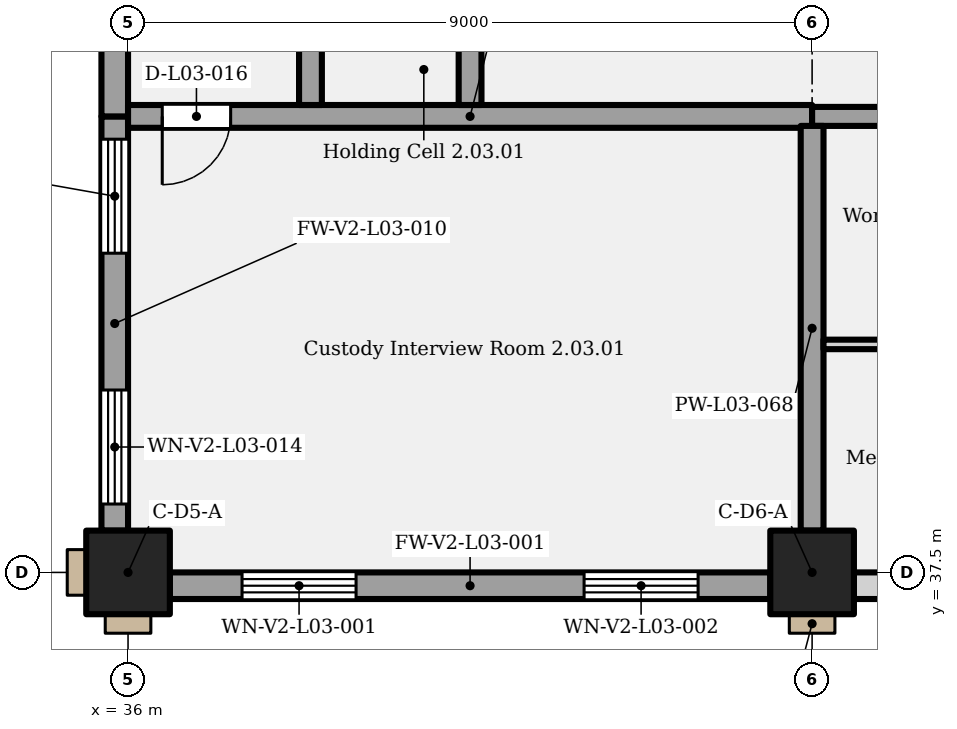
"""IFC4 building model, lengths in metres.
Left out: names, types, materials, properties, quantities, classifications, styles, units other than length and angle.
Written with IfcOpenShell. Run it as: python <this file> out.ifc"""

import sys

from ifc_helpers import new_model, si_unit, direction, frame, frame_2d, origin, origin_2d, place, context, subcontext, project, spatial, rectangle, extrude, element, fill, save


model = new_model("IFC4")
c1 = context("Model", 3, precision=1e-05, world=origin(), true_north=direction((0.0, 1.0)))
c2 = subcontext(c1, "Body", "Model", "MODEL_VIEW")
j1 = project(units=[si_unit("LENGTHUNIT", "METRE"), si_unit("PLANEANGLEUNIT", "RADIAN")], contexts=[c1])
p1 = place(None, origin())
s1 = spatial("IfcSite", under=j1, at=p1, CompositionType="ELEMENT")
p2 = place(p1, origin())
s2 = spatial("IfcBuilding", under=s1, at=p2, CompositionType="ELEMENT")
p3 = place(p2, frame((0.0, 0.0, 17.4)))
s3 = spatial("IfcBuildingStorey", under=s2, at=p3, CompositionType="ELEMENT", Elevation=17.4)
for number, where, z_axis, x_axis in (
    (1, (36.0, 37.5, 0.0), (0.0, 0.0, 1.0), (1.0, 0.0, 0.0)),
    (2, (45.0, 37.5, 0.0), (0.0, 0.0, 1.0), (1.0, 0.0, 0.0)),
):
    element("IfcColumn", number, at=place(p3, frame(where, z_axis=z_axis, x_axis=x_axis)), inside=s3, PredefinedType="COLUMN", context=c2, shape_type="SweptSolid", body=[
        extrude(rectangle(XDim=1.1, YDim=1.1, at=origin_2d()), origin(), (0.0, 0.0, 1.0), 5.4),
    ])
p4 = place(p3, frame((36.55, 37.325, 0.0), z_axis=(0.0, 0.0, 1.0), x_axis=(1.0, 0.0, 0.0)))
e3 = element("IfcWall", 3, at=p4, inside=s3, PredefinedType="SOLIDWALL", context=c2, shape_type="SweptSolid", body=[
    extrude(rectangle(XDim=7.9, YDim=0.35, at=frame_2d((3.95, 0.0))), origin(), (0.0, 0.0, 1.0), 5.15),
])
p5 = place(p4, frame((0.95, 0.0, 1.05)))
e4 = element("IfcOpeningElement", 4, at=p5, cuts=e3, PredefinedType="OPENING", context=c2, shape_type="SweptSolid", body=[
    extrude(rectangle(XDim=1.5, YDim=3.5, at=frame_2d((0.75, 1.75))), frame((0.0, 0.185, 0.0), z_axis=(0.0, -1.0, 0.0), x_axis=(1.0, 0.0, 0.0)), (0.0, 0.0, 1.0), 0.37),
])
p6 = place(p4, frame((5.45, 0.0, 1.05)))
e5 = element("IfcOpeningElement", 5, at=p6, cuts=e3, PredefinedType="OPENING", context=c2, shape_type="SweptSolid", body=[
    extrude(rectangle(XDim=1.5, YDim=3.5, at=frame_2d((0.75, 1.75))), frame((0.0, 0.185, 0.0), z_axis=(0.0, -1.0, 0.0), x_axis=(1.0, 0.0, 0.0)), (0.0, 0.0, 1.0), 0.37),
])
p7 = place(p3, frame((45.55, 37.325, 0.0), z_axis=(0.0, 0.0, 1.0), x_axis=(1.0, 0.0, 0.0)))
e6 = element("IfcWall", 6, at=p7, inside=s3, PredefinedType="SOLIDWALL", context=c2, shape_type="SweptSolid", body=[
    extrude(rectangle(XDim=3.95, YDim=0.35, at=frame_2d((1.975, 0.0))), origin(), (0.0, 0.0, 1.0), 5.15),
])
p8 = place(p7, frame((0.95, 0.0, 1.05)))
e7 = element("IfcOpeningElement", 7, at=p8, cuts=e6, PredefinedType="OPENING", context=c2, shape_type="SweptSolid", body=[
    extrude(rectangle(XDim=1.5, YDim=3.5, at=frame_2d((0.75, 1.75))), frame((0.0, 0.185, 0.0), z_axis=(0.0, -1.0, 0.0), x_axis=(1.0, 0.0, 0.0)), (0.0, 0.0, 1.0), 0.37),
])
p9 = place(p3, frame((35.825, 38.05, 0.0), z_axis=(0.0, 0.0, 1.0), x_axis=(0.0, 1.0, 0.0)))
e8 = element("IfcWall", 8, at=p9, inside=s3, PredefinedType="SOLIDWALL", context=c2, shape_type="SweptSolid", body=[
    extrude(rectangle(XDim=5.45, YDim=0.35, at=frame_2d((2.725, 0.0))), origin(), (0.0, 0.0, 1.0), 5.15),
])
p10 = place(p9, frame((0.35, 0.0, 1.05)))
e9 = element("IfcOpeningElement", 9, at=p10, cuts=e8, PredefinedType="OPENING", context=c2, shape_type="SweptSolid", body=[
    extrude(rectangle(XDim=1.5, YDim=3.5, at=frame_2d((0.75, 1.75))), frame((0.0, 0.185, 0.0), z_axis=(0.0, -1.0, 0.0), x_axis=(1.0, 0.0, 0.0)), (0.0, 0.0, 1.0), 0.37),
])
p11 = place(p9, frame((3.65, 0.0, 1.05)))
e10 = element("IfcOpeningElement", 10, at=p11, cuts=e8, PredefinedType="OPENING", context=c2, shape_type="SweptSolid", body=[
    extrude(rectangle(XDim=1.5, YDim=3.5, at=frame_2d((0.75, 1.75))), frame((0.0, 0.185, 0.0), z_axis=(0.0, -1.0, 0.0), x_axis=(1.0, 0.0, 0.0)), (0.0, 0.0, 1.0), 0.37),
])
p12 = place(p3, frame((35.825, 43.5, 0.0), z_axis=(0.0, 0.0, 1.0), x_axis=(0.0, 1.0, 0.0)))
e11 = element("IfcWall", 11, at=p12, inside=s3, PredefinedType="SOLIDWALL", context=c2, shape_type="SweptSolid", body=[
    extrude(rectangle(XDim=9.95, YDim=0.35, at=frame_2d((4.975, 0.0))), origin(), (0.0, 0.0, 1.0), 5.15),
])
p13 = place(p12, frame((1.5, 0.0, 1.05)))
e12 = element("IfcOpeningElement", 12, at=p13, cuts=e11, PredefinedType="OPENING", context=c2, shape_type="SweptSolid", body=[
    extrude(rectangle(XDim=1.5, YDim=3.5, at=frame_2d((0.75, 1.75))), frame((0.0, 0.185, 0.0), z_axis=(0.0, -1.0, 0.0), x_axis=(1.0, 0.0, 0.0)), (0.0, 0.0, 1.0), 0.37),
])
p14 = place(p12, frame((4.8, 0.0, 1.05)))
e13 = element("IfcOpeningElement", 13, at=p14, cuts=e11, PredefinedType="OPENING", context=c2, shape_type="SweptSolid", body=[
    extrude(rectangle(XDim=1.5, YDim=3.5, at=frame_2d((0.75, 1.75))), frame((0.0, 0.185, 0.0), z_axis=(0.0, -1.0, 0.0), x_axis=(1.0, 0.0, 0.0)), (0.0, 0.0, 1.0), 0.37),
])
p15 = place(p12, frame((8.1, 0.0, 1.05)))
e14 = element("IfcOpeningElement", 14, at=p15, cuts=e11, PredefinedType="OPENING", context=c2, shape_type="SweptSolid", body=[
    extrude(rectangle(XDim=1.5, YDim=3.5, at=frame_2d((0.75, 1.75))), frame((0.0, 0.185, 0.0), z_axis=(0.0, -1.0, 0.0), x_axis=(1.0, 0.0, 0.0)), (0.0, 0.0, 1.0), 0.37),
])
p16 = place(p3, frame((45.15, 40.5, 0.0), z_axis=(0.0, 0.0, 1.0), x_axis=(1.0, 0.0, 0.0)))
e15 = element("IfcWall", 15, at=p16, inside=s3, PredefinedType="PARTITIONING", context=c2, shape_type="SweptSolid", body=[
    extrude(rectangle(XDim=4.275, YDim=0.125, at=frame_2d((2.138, 0.0))), origin(), (0.0, 0.0, 1.0), 5.15),
])
p17 = place(p3, frame((36.0, 43.5, 0.0), z_axis=(0.0, 0.0, 1.0), x_axis=(1.0, 0.0, 0.0)))
e16 = element("IfcWall", 16, at=p17, inside=s3, PredefinedType="PARTITIONING", context=c2, shape_type="SweptSolid", body=[
    extrude(rectangle(XDim=9.0, YDim=0.3, at=frame_2d((4.5, 0.0))), origin(), (0.0, 0.0, 1.0), 5.15),
])
p18 = place(p17, frame((1.35, 0.0, 0.0), z_axis=(0.0, 0.0, 1.0), x_axis=(-1.0, 0.0, 0.0)))
e17 = element("IfcOpeningElement", 17, at=p18, cuts=e16, PredefinedType="OPENING", context=c2, shape_type="SweptSolid", body=[
    extrude(rectangle(XDim=0.9, YDim=2.1, at=frame_2d((0.45, 1.05))), frame((0.0, 0.16, 0.0), z_axis=(0.0, -1.0, 0.0), x_axis=(1.0, 0.0, 0.0)), (0.0, 0.0, 1.0), 0.32),
])
p19 = place(p3, frame((45.0, 43.5, 0.0), z_axis=(0.0, 0.0, 1.0), x_axis=(1.0, 0.0, 0.0)))
e18 = element("IfcWall", 18, at=p19, inside=s3, PredefinedType="PARTITIONING", context=c2, shape_type="SweptSolid", body=[
    extrude(rectangle(XDim=4.625, YDim=0.25, at=frame_2d((2.312, 0.0))), origin(), (0.0, 0.0, 1.0), 5.15),
])
p20 = place(p3, frame((38.4, 43.65, 0.0), z_axis=(0.0, 0.0, 1.0), x_axis=(0.0, 1.0, 0.0)))
e19 = element("IfcWall", 19, at=p20, inside=s3, PredefinedType="PARTITIONING", context=c2, shape_type="SweptSolid", body=[
    extrude(rectangle(XDim=10.35, YDim=0.3, at=frame_2d((5.175, 0.0))), origin(), (0.0, 0.0, 1.0), 5.15),
])
p21 = place(p20, frame((2.05, 0.0, 0.0), z_axis=(0.0, 0.0, 1.0), x_axis=(-1.0, 0.0, 0.0)))
e20 = element("IfcOpeningElement", 20, at=p21, cuts=e19, PredefinedType="OPENING", context=c2, shape_type="SweptSolid", body=[
    extrude(rectangle(XDim=0.9, YDim=2.0, at=frame_2d((0.45, 1.0))), frame((0.0, 0.16, 0.0), z_axis=(0.0, -1.0, 0.0), x_axis=(1.0, 0.0, 0.0)), (0.0, 0.0, 1.0), 0.32),
])
p22 = place(p20, frame((5.55, 0.0, 0.0), z_axis=(0.0, 0.0, 1.0), x_axis=(-1.0, 0.0, 0.0)))
e21 = element("IfcOpeningElement", 21, at=p22, cuts=e19, PredefinedType="OPENING", context=c2, shape_type="SweptSolid", body=[
    extrude(rectangle(XDim=0.9, YDim=2.0, at=frame_2d((0.45, 1.0))), frame((0.0, 0.16, 0.0), z_axis=(0.0, -1.0, 0.0), x_axis=(1.0, 0.0, 0.0)), (0.0, 0.0, 1.0), 0.32),
])
p23 = place(p20, frame((9.05, 0.0, 0.0), z_axis=(0.0, 0.0, 1.0), x_axis=(-1.0, 0.0, 0.0)))
e22 = element("IfcOpeningElement", 22, at=p23, cuts=e19, PredefinedType="OPENING", context=c2, shape_type="SweptSolid", body=[
    extrude(rectangle(XDim=0.9, YDim=2.0, at=frame_2d((0.45, 1.0))), frame((0.0, 0.16, 0.0), z_axis=(0.0, -1.0, 0.0), x_axis=(1.0, 0.0, 0.0)), (0.0, 0.0, 1.0), 0.32),
])
p24 = place(p3, frame((40.5, 43.65, 0.0), z_axis=(0.0, 0.0, 1.0), x_axis=(0.0, 1.0, 0.0)))
e23 = element("IfcWall", 23, at=p24, inside=s3, PredefinedType="PARTITIONING", context=c2, shape_type="SweptSolid", body=[
    extrude(rectangle(XDim=10.35, YDim=0.3, at=frame_2d((5.175, 0.0))), origin(), (0.0, 0.0, 1.0), 5.15),
])
p25 = place(p24, frame((9.1, 0.0, 0.0), z_axis=(0.0, 0.0, 1.0), x_axis=(-1.0, 0.0, 0.0)))
e24 = element("IfcOpeningElement", 24, at=p25, cuts=e23, PredefinedType="OPENING", context=c2, shape_type="SweptSolid", body=[
    extrude(rectangle(XDim=1.0, YDim=2.0, at=frame_2d((0.5, 1.0))), frame((0.0, 0.16, 0.0), z_axis=(0.0, -1.0, 0.0), x_axis=(1.0, 0.0, 0.0)), (0.0, 0.0, 1.0), 0.32),
])
p26 = place(p3, frame((45.0, 38.05, 0.0), z_axis=(0.0, 0.0, 1.0), x_axis=(0.0, 1.0, 0.0)))
e25 = element("IfcWall", 25, at=p26, inside=s3, PredefinedType="PARTITIONING", context=c2, shape_type="SweptSolid", body=[
    extrude(rectangle(XDim=5.325, YDim=0.3, at=frame_2d((2.663, 0.0))), origin(), (0.0, 0.0, 1.0), 4.2),
])
p27 = place(p5, origin())
e26 = element("IfcWindow", 26, at=p27, inside=s3, PartitioningType="SINGLE_PANEL", PredefinedType="WINDOW", context=c2, shape_type="SweptSolid", body=[
    extrude(rectangle(XDim=1.5, YDim=3.5, at=frame_2d((0.75, 1.75))), frame((0.0, 0.03, 0.0), z_axis=(0.0, -1.0, 0.0), x_axis=(1.0, 0.0, 0.0)), (0.0, 0.0, 1.0), 0.06),
])
fill(e4, e26)
p28 = place(p6, origin())
e27 = element("IfcWindow", 27, at=p28, inside=s3, PartitioningType="SINGLE_PANEL", PredefinedType="WINDOW", context=c2, shape_type="SweptSolid", body=[
    extrude(rectangle(XDim=1.5, YDim=3.5, at=frame_2d((0.75, 1.75))), frame((0.0, 0.03, 0.0), z_axis=(0.0, -1.0, 0.0), x_axis=(1.0, 0.0, 0.0)), (0.0, 0.0, 1.0), 0.06),
])
fill(e5, e27)
p29 = place(p10, origin())
e28 = element("IfcWindow", 28, at=p29, inside=s3, PartitioningType="SINGLE_PANEL", PredefinedType="WINDOW", context=c2, shape_type="SweptSolid", body=[
    extrude(rectangle(XDim=1.5, YDim=3.5, at=frame_2d((0.75, 1.75))), frame((0.0, 0.03, 0.0), z_axis=(0.0, -1.0, 0.0), x_axis=(1.0, 0.0, 0.0)), (0.0, 0.0, 1.0), 0.06),
])
fill(e9, e28)
p30 = place(p11, origin())
e29 = element("IfcWindow", 29, at=p30, inside=s3, PartitioningType="SINGLE_PANEL", PredefinedType="WINDOW", context=c2, shape_type="SweptSolid", body=[
    extrude(rectangle(XDim=1.5, YDim=3.5, at=frame_2d((0.75, 1.75))), frame((0.0, 0.03, 0.0), z_axis=(0.0, -1.0, 0.0), x_axis=(1.0, 0.0, 0.0)), (0.0, 0.0, 1.0), 0.06),
])
fill(e10, e29)
p31 = place(p18, origin())
e30 = element("IfcDoor", 30, at=p31, inside=s3, OperationType="SINGLE_SWING_RIGHT", PredefinedType="DOOR", context=c2, shape_type="SweptSolid", body=[
    extrude(rectangle(XDim=0.9, YDim=2.1, at=frame_2d((0.45, 1.05))), frame((0.0, 0.025, 0.0), z_axis=(0.0, -1.0, 0.0), x_axis=(1.0, 0.0, 0.0)), (0.0, 0.0, 1.0), 0.05),
])
fill(e17, e30)
save(model, sys.argv[1])
